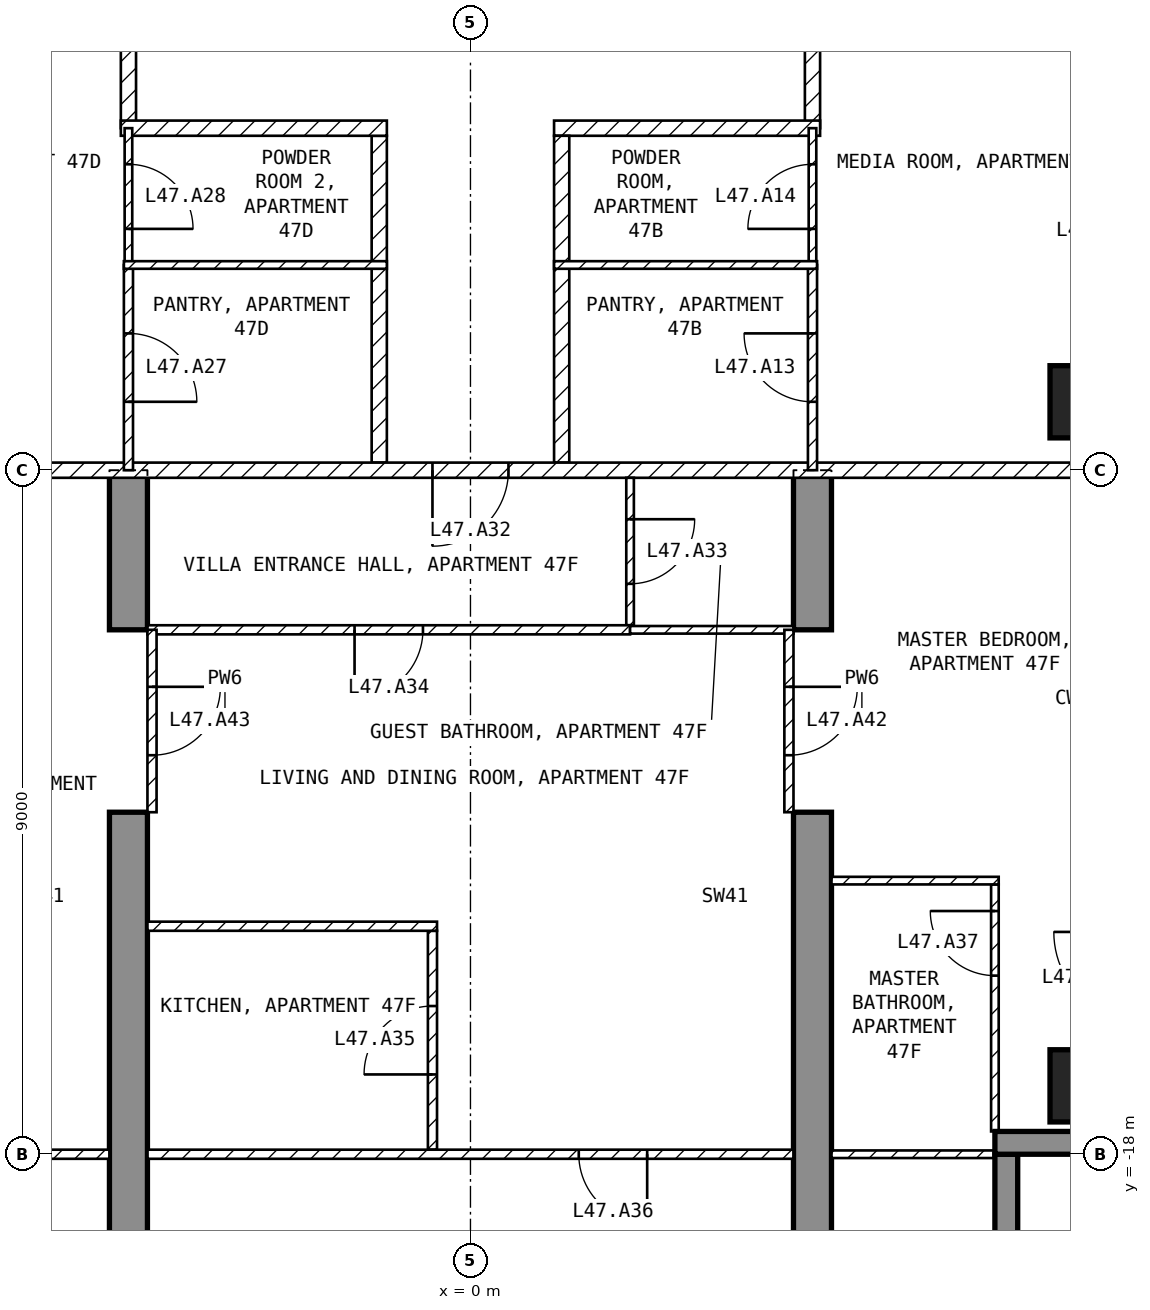
"""IFC4 building model, lengths in metres.
Left out: names, types, materials, properties, quantities, classifications, styles, units other than length and angle.
Written with IfcOpenShell. Run it as: python <this file> out.ifc"""

import sys

from ifc_helpers import new_model, si_unit, direction, frame, frame_2d, origin, origin_2d, place, context, subcontext, project, spatial, polyline, rectangle, outline, extrude, element, fill, save


model = new_model("IFC4")
c1 = context("Model", 3, precision=1e-05, world=origin(), true_north=direction((0.0, 1.0)))
c2 = subcontext(c1, "Body", "Model", "MODEL_VIEW")
j1 = project(units=[si_unit("LENGTHUNIT", "METRE"), si_unit("PLANEANGLEUNIT", "RADIAN")], contexts=[c1])
p1 = place(None, origin())
s1 = spatial("IfcSite", under=j1, at=p1, CompositionType="ELEMENT")
p2 = place(p1, origin())
s2 = spatial("IfcBuilding", under=s1, at=p2, CompositionType="ELEMENT")
p3 = place(p2, frame((0.0, 0.0, 191.1)))
s3 = spatial("IfcBuildingStorey", under=s2, at=p3, CompositionType="ELEMENT", Elevation=191.1)
for number, where, z_axis, x_axis in (
    (1, (8.1, -17.1, -0.25), (0.0, 0.0, 1.0), (1.0, 0.0, 0.0)),
    (2, (8.1, -8.1, -0.25), (0.0, 0.0, 1.0), (1.0, 0.0, 0.0)),
):
    element("IfcColumn", number, at=place(p3, frame(where, z_axis=z_axis, x_axis=x_axis)), inside=s3, PredefinedType="COLUMN", context=c2, shape_type="SweptSolid", body=[
        extrude(rectangle(XDim=0.95, YDim=0.95, at=origin_2d()), origin(), (0.0, 0.0, 1.0), 3.5),
    ])
for number, where, z_axis, x_axis in (
    (3, (-4.75, -20.225, -0.25), (1.0, 0.0, 0.0), (0.0, 1.0, 0.0)),
    (4, (4.25, -20.225, -0.25), (1.0, 0.0, 0.0), (0.0, 1.0, 0.0)),
):
    element("IfcWall", number, at=place(p3, frame(where, z_axis=z_axis, x_axis=x_axis)), inside=s3, PredefinedType="SHEAR", context=c2, shape_type="SweptSolid", body=[
        extrude(outline(polyline([(0.0, 0.0), (6.725, 0.0), (6.725, 2.65), (9.125, 2.65), (9.125, 0.0), (11.225, 0.0), (11.225, 3.5), (0.0, 3.5), (0.0, 0.0)])), origin(), (0.0, 0.0, 1.0), 0.5),
    ])
p4 = place(p3, frame((7.05, -19.8, 0.0), z_axis=(0.0, 0.0, 1.0), x_axis=(0.0, 1.0, 0.0)))
e5 = element("IfcWall", 5, at=p4, inside=s3, PredefinedType="SOLIDWALL", context=c2, shape_type="SweptSolid", body=[
    extrude(rectangle(XDim=1.8, YDim=0.3, at=frame_2d((0.9, 0.0))), origin(), (0.0, 0.0, 1.0), 3.25),
])
p5 = place(p3, frame((6.9, -17.85, 0.0), z_axis=(0.0, 0.0, 1.0), x_axis=(1.0, 0.0, 0.0)))
e6 = element("IfcWall", 6, at=p5, inside=s3, PredefinedType="SOLIDWALL", context=c2, shape_type="SweptSolid", body=[
    extrude(rectangle(XDim=1.85, YDim=0.3, at=frame_2d((0.925, 0.0))), origin(), (0.0, 0.0, 1.0), 3.25),
])
p6 = place(p3, frame((4.5, -1.3, 0.0), z_axis=(0.0, 0.0, 1.0), x_axis=(0.0, -1.0, 0.0)))
e7 = element("IfcWall", 7, at=p6, inside=s3, PredefinedType="PARTITIONING", context=c2, shape_type="SweptSolid", body=[
    extrude(rectangle(XDim=3.2, YDim=0.2, at=frame_2d((1.6, 0.0))), origin(), (0.0, 0.0, 1.0), 3.25),
])
p7 = place(p3, frame((4.6, -4.5, 0.0), z_axis=(0.0, 0.0, 1.0), x_axis=(-1.0, 0.0, 0.0)))
e8 = element("IfcWall", 8, at=p7, inside=s3, PredefinedType="PARTITIONING", context=c2, shape_type="SweptSolid", body=[
    extrude(rectangle(XDim=3.5, YDim=0.2, at=frame_2d((1.75, 0.0))), origin(), (0.0, 0.0, 1.0), 3.25),
])
p8 = place(p3, frame((1.2, -4.6, 0.0), z_axis=(0.0, 0.0, 1.0), x_axis=(0.0, -1.0, 0.0)))
e9 = element("IfcWall", 9, at=p8, inside=s3, PredefinedType="PARTITIONING", context=c2, shape_type="SweptSolid", body=[
    extrude(rectangle(XDim=4.3, YDim=0.2, at=frame_2d((2.15, 0.0))), origin(), (0.0, 0.0, 1.0), 3.25),
])
p9 = place(p3, frame((-4.5, -4.5, 0.0), z_axis=(0.0, 0.0, 1.0), x_axis=(0.0, 1.0, 0.0)))
e10 = element("IfcWall", 10, at=p9, inside=s3, PredefinedType="PARTITIONING", context=c2, shape_type="SweptSolid", body=[
    extrude(rectangle(XDim=3.2, YDim=0.2, at=frame_2d((1.6, 0.0))), origin(), (0.0, 0.0, 1.0), 3.25),
])
p10 = place(p3, frame((-1.2, -8.9, 0.0), z_axis=(0.0, 0.0, 1.0), x_axis=(0.0, 1.0, 0.0)))
e11 = element("IfcWall", 11, at=p10, inside=s3, PredefinedType="PARTITIONING", context=c2, shape_type="SweptSolid", body=[
    extrude(rectangle(XDim=4.3, YDim=0.2, at=frame_2d((2.15, 0.0))), origin(), (0.0, 0.0, 1.0), 3.25),
])
p11 = place(p3, frame((-1.1, -4.5, 0.0), z_axis=(0.0, 0.0, 1.0), x_axis=(-1.0, 0.0, 0.0)))
e12 = element("IfcWall", 12, at=p11, inside=s3, PredefinedType="PARTITIONING", context=c2, shape_type="SweptSolid", body=[
    extrude(rectangle(XDim=3.5, YDim=0.2, at=frame_2d((1.75, 0.0))), origin(), (0.0, 0.0, 1.0), 3.25),
])
p12 = place(p3, frame((8.92, -9.0, 0.0), z_axis=(0.0, 0.0, 1.0), x_axis=(-1.0, 0.0, 0.0)))
e13 = element("IfcWall", 13, at=p12, inside=s3, PredefinedType="PARTITIONING", context=c2, shape_type="SweptSolid", body=[
    extrude(rectangle(XDim=17.84, YDim=0.2, at=frame_2d((8.92, 0.0))), origin(), (0.0, 0.0, 1.0), 3.25),
])
p13 = place(p12, frame((8.42, 0.0, 0.0)))
e14 = element("IfcOpeningElement", 14, at=p13, cuts=e13, PredefinedType="OPENING", context=c2, shape_type="SweptSolid", body=[
    extrude(rectangle(XDim=1.0, YDim=2.1, at=frame_2d((0.5, 1.05))), frame((0.0, 0.11, 0.0), z_axis=(0.0, -1.0, 0.0), x_axis=(1.0, 0.0, 0.0)), (0.0, 0.0, 1.0), 0.22),
])
p14 = place(p3, frame((4.5, -6.3, 0.0), z_axis=(0.0, 0.0, 1.0), x_axis=(0.0, 1.0, 0.0)))
e15 = element("IfcWall", 15, at=p14, inside=s3, PredefinedType="PARTITIONING", context=c2, shape_type="SweptSolid", body=[
    extrude(rectangle(XDim=1.8, YDim=0.1, at=frame_2d((0.9, 0.0))), origin(), (0.0, 0.0, 1.0), 3.25),
])
p15 = place(p14, frame((0.475, 0.0, 0.0)))
e16 = element("IfcOpeningElement", 16, at=p15, cuts=e15, PredefinedType="OPENING", context=c2, shape_type="SweptSolid", body=[
    extrude(rectangle(XDim=0.85, YDim=2.1, at=frame_2d((0.425, 1.05))), frame((0.0, 0.06, 0.0), z_axis=(0.0, -1.0, 0.0), x_axis=(1.0, 0.0, 0.0)), (0.0, 0.0, 1.0), 0.12),
])
p16 = place(p3, frame((4.5, -9.0, 0.0), z_axis=(0.0, 0.0, 1.0), x_axis=(0.0, 1.0, 0.0)))
e17 = element("IfcWall", 17, at=p16, inside=s3, PredefinedType="PARTITIONING", context=c2, shape_type="SweptSolid", body=[
    extrude(rectangle(XDim=2.7, YDim=0.12, at=frame_2d((1.35, 0.0))), origin(), (0.0, 0.0, 1.0), 3.25),
])
p17 = place(p16, frame((0.9, 0.0, 0.0)))
e18 = element("IfcOpeningElement", 18, at=p17, cuts=e17, PredefinedType="OPENING", context=c2, shape_type="SweptSolid", body=[
    extrude(rectangle(XDim=0.9, YDim=2.1, at=frame_2d((0.45, 1.05))), frame((0.0, 0.07, 0.0), z_axis=(0.0, -1.0, 0.0), x_axis=(1.0, 0.0, 0.0)), (0.0, 0.0, 1.0), 0.14),
])
p18 = place(p3, frame((4.56, -6.3, 0.0), z_axis=(0.0, 0.0, 1.0), x_axis=(-1.0, 0.0, 0.0)))
e19 = element("IfcWall", 19, at=p18, inside=s3, PredefinedType="PARTITIONING", context=c2, shape_type="SweptSolid", body=[
    extrude(rectangle(XDim=3.46, YDim=0.1, at=frame_2d((1.73, 0.0))), origin(), (0.0, 0.0, 1.0), 3.25),
])
p19 = place(p3, frame((-4.5, -4.5, 0.0), z_axis=(0.0, 0.0, 1.0), x_axis=(0.0, -1.0, 0.0)))
e20 = element("IfcWall", 20, at=p19, inside=s3, PredefinedType="PARTITIONING", context=c2, shape_type="SweptSolid", body=[
    extrude(rectangle(XDim=1.8, YDim=0.1, at=frame_2d((0.9, 0.0))), origin(), (0.0, 0.0, 1.0), 3.25),
])
p20 = place(p19, frame((0.475, 0.0, 0.0)))
e21 = element("IfcOpeningElement", 21, at=p20, cuts=e20, PredefinedType="OPENING", context=c2, shape_type="SweptSolid", body=[
    extrude(rectangle(XDim=0.85, YDim=2.1, at=frame_2d((0.425, 1.05))), frame((0.0, 0.06, 0.0), z_axis=(0.0, -1.0, 0.0), x_axis=(1.0, 0.0, 0.0)), (0.0, 0.0, 1.0), 0.12),
])
p21 = place(p3, frame((-4.5, -6.3, 0.0), z_axis=(0.0, 0.0, 1.0), x_axis=(0.0, -1.0, 0.0)))
e22 = element("IfcWall", 22, at=p21, inside=s3, PredefinedType="PARTITIONING", context=c2, shape_type="SweptSolid", body=[
    extrude(rectangle(XDim=2.7, YDim=0.12, at=frame_2d((1.35, 0.0))), origin(), (0.0, 0.0, 1.0), 3.25),
])
p22 = place(p21, frame((0.9, 0.0, 0.0)))
e23 = element("IfcOpeningElement", 23, at=p22, cuts=e22, PredefinedType="OPENING", context=c2, shape_type="SweptSolid", body=[
    extrude(rectangle(XDim=0.9, YDim=2.1, at=frame_2d((0.45, 1.05))), frame((0.0, 0.07, 0.0), z_axis=(0.0, -1.0, 0.0), x_axis=(1.0, 0.0, 0.0)), (0.0, 0.0, 1.0), 0.14),
])
p23 = place(p3, frame((-1.1, -6.3, 0.0), z_axis=(0.0, 0.0, 1.0), x_axis=(-1.0, 0.0, 0.0)))
e24 = element("IfcWall", 24, at=p23, inside=s3, PredefinedType="PARTITIONING", context=c2, shape_type="SweptSolid", body=[
    extrude(rectangle(XDim=3.46, YDim=0.1, at=frame_2d((1.73, 0.0))), origin(), (0.0, 0.0, 1.0), 3.25),
])
p24 = place(p3, frame((2.1, -9.1, 0.0), z_axis=(0.0, 0.0, 1.0), x_axis=(0.0, -1.0, 0.0)))
e25 = element("IfcWall", 25, at=p24, inside=s3, PredefinedType="PARTITIONING", context=c2, shape_type="SweptSolid", body=[
    extrude(rectangle(XDim=1.94, YDim=0.1, at=frame_2d((0.97, 0.0))), origin(), (0.0, 0.0, 1.0), 3.25),
])
p25 = place(p24, frame((0.545, 0.0, 0.0)))
e26 = element("IfcOpeningElement", 26, at=p25, cuts=e25, PredefinedType="OPENING", context=c2, shape_type="SweptSolid", body=[
    extrude(rectangle(XDim=0.85, YDim=2.1, at=frame_2d((0.425, 1.05))), frame((0.0, 0.06, 0.0), z_axis=(0.0, -1.0, 0.0), x_axis=(1.0, 0.0, 0.0)), (0.0, 0.0, 1.0), 0.12),
])
p26 = place(p3, frame((2.1, -11.1, 0.0), z_axis=(0.0, 0.0, 1.0), x_axis=(-1.0, 0.0, 0.0)))
e27 = element("IfcWall", 27, at=p26, inside=s3, PredefinedType="PARTITIONING", context=c2, shape_type="SweptSolid", body=[
    extrude(rectangle(XDim=6.35, YDim=0.12, at=frame_2d((3.175, 0.0))), origin(), (0.0, 0.0, 1.0), 3.25),
])
p27 = place(p26, frame((2.725, 0.0, 0.0)))
e28 = element("IfcOpeningElement", 28, at=p27, cuts=e27, PredefinedType="OPENING", context=c2, shape_type="SweptSolid", body=[
    extrude(rectangle(XDim=0.9, YDim=2.1, at=frame_2d((0.45, 1.05))), frame((0.0, 0.07, 0.0), z_axis=(0.0, -1.0, 0.0), x_axis=(1.0, 0.0, 0.0)), (0.0, 0.0, 1.0), 0.14),
])
p28 = place(p3, frame((4.25, -11.1, 0.0), z_axis=(0.0, 0.0, 1.0), x_axis=(-1.0, 0.0, 0.0)))
e29 = element("IfcWall", 29, at=p28, inside=s3, PredefinedType="PARTITIONING", context=c2, shape_type="SweptSolid", body=[
    extrude(rectangle(XDim=2.15, YDim=0.1, at=frame_2d((1.075, 0.0))), origin(), (0.0, 0.0, 1.0), 3.25),
])
p29 = place(p3, frame((-0.5, -17.94, 0.0), z_axis=(0.0, 0.0, 1.0), x_axis=(0.0, 1.0, 0.0)))
e30 = element("IfcWall", 30, at=p29, inside=s3, PredefinedType="PARTITIONING", context=c2, shape_type="SweptSolid", body=[
    extrude(rectangle(XDim=2.88, YDim=0.12, at=frame_2d((1.44, 0.0))), origin(), (0.0, 0.0, 1.0), 3.25),
])
p30 = place(p29, frame((0.99, 0.0, 0.0)))
e31 = element("IfcOpeningElement", 31, at=p30, cuts=e30, PredefinedType="OPENING", context=c2, shape_type="SweptSolid", body=[
    extrude(rectangle(XDim=0.9, YDim=2.1, at=frame_2d((0.45, 1.05))), frame((0.0, 0.07, 0.0), z_axis=(0.0, -1.0, 0.0), x_axis=(1.0, 0.0, 0.0)), (0.0, 0.0, 1.0), 0.14),
])
p31 = place(p3, frame((-0.44, -15.0, 0.0), z_axis=(0.0, 0.0, 1.0), x_axis=(-1.0, 0.0, 0.0)))
e32 = element("IfcWall", 32, at=p31, inside=s3, PredefinedType="PARTITIONING", context=c2, shape_type="SweptSolid", body=[
    extrude(rectangle(XDim=3.81, YDim=0.12, at=frame_2d((1.905, 0.0))), origin(), (0.0, 0.0, 1.0), 3.25),
])
p32 = place(p3, frame((4.25, -18.0, 0.0), z_axis=(0.0, 0.0, 1.0), x_axis=(-1.0, 0.0, 0.0)))
e33 = element("IfcWall", 33, at=p32, inside=s3, PredefinedType="PARTITIONING", context=c2, shape_type="SweptSolid", body=[
    extrude(rectangle(XDim=8.5, YDim=0.12, at=frame_2d((4.25, 0.0))), origin(), (0.0, 0.0, 1.0), 3.25),
])
p33 = place(p32, frame((1.925, 0.0, 0.0)))
e34 = element("IfcOpeningElement", 34, at=p33, cuts=e33, PredefinedType="OPENING", context=c2, shape_type="SweptSolid", body=[
    extrude(rectangle(XDim=0.9, YDim=2.1, at=frame_2d((0.45, 1.05))), frame((0.0, 0.07, 0.0), z_axis=(0.0, -1.0, 0.0), x_axis=(1.0, 0.0, 0.0)), (0.0, 0.0, 1.0), 0.14),
])
p34 = place(p3, frame((6.9, -17.7, 0.0), z_axis=(0.0, 0.0, 1.0), x_axis=(0.0, 1.0, 0.0)))
e35 = element("IfcWall", 35, at=p34, inside=s3, PredefinedType="PARTITIONING", context=c2, shape_type="SweptSolid", body=[
    extrude(rectangle(XDim=3.25, YDim=0.1, at=frame_2d((1.625, 0.0))), origin(), (0.0, 0.0, 1.0), 3.25),
])
p35 = place(p34, frame((2.05, 0.0, 0.0)))
e36 = element("IfcOpeningElement", 36, at=p35, cuts=e35, PredefinedType="OPENING", context=c2, shape_type="SweptSolid", body=[
    extrude(rectangle(XDim=0.85, YDim=2.1, at=frame_2d((0.425, 1.05))), frame((0.0, 0.06, 0.0), z_axis=(0.0, -1.0, 0.0), x_axis=(1.0, 0.0, 0.0)), (0.0, 0.0, 1.0), 0.12),
])
p36 = place(p3, frame((6.95, -14.4, 0.0), z_axis=(0.0, 0.0, 1.0), x_axis=(-1.0, 0.0, 0.0)))
e37 = element("IfcWall", 37, at=p36, inside=s3, PredefinedType="PARTITIONING", context=c2, shape_type="SweptSolid", body=[
    extrude(rectangle(XDim=2.2, YDim=0.1, at=frame_2d((1.1, 0.0))), origin(), (0.0, 0.0, 1.0), 3.25),
])
p37 = place(p3, frame((7.12, -18.0, 0.0), z_axis=(0.0, 0.0, 1.0), x_axis=(-1.0, 0.0, 0.0)))
e38 = element("IfcWall", 38, at=p37, inside=s3, PredefinedType="PARTITIONING", context=c2, shape_type="SweptSolid", body=[
    extrude(rectangle(XDim=2.37, YDim=0.1, at=frame_2d((1.185, 0.0))), origin(), (0.0, 0.0, 1.0), 3.25),
])
p38 = place(p3, frame((-4.75, -18.0, 0.0), z_axis=(0.0, 0.0, 1.0), x_axis=(-1.0, 0.0, 0.0)))
e39 = element("IfcWall", 39, at=p38, inside=s3, PredefinedType="PARTITIONING", context=c2, shape_type="SweptSolid", body=[
    extrude(rectangle(XDim=2.37, YDim=0.12, at=frame_2d((1.185, 0.0))), origin(), (0.0, 0.0, 1.0), 3.25),
])
p39 = place(p3, frame((4.19, -11.1, 0.0), z_axis=(0.0, 0.0, 1.0), x_axis=(0.0, -1.0, 0.0)))
e40 = element("IfcWall", 40, at=p39, inside=s3, PredefinedType="PARTITIONING", context=c2, shape_type="SweptSolid", body=[
    extrude(rectangle(XDim=2.4, YDim=0.12, at=frame_2d((1.2, 0.0))), origin(), (0.0, 0.0, 1.0), 2.4),
])
p40 = place(p39, frame((0.75, 0.0, 0.0)))
e41 = element("IfcOpeningElement", 41, at=p40, cuts=e40, PredefinedType="OPENING", context=c2, shape_type="SweptSolid", body=[
    extrude(rectangle(XDim=0.9, YDim=2.1, at=frame_2d((0.45, 1.05))), frame((0.0, 0.07, 0.0), z_axis=(0.0, -1.0, 0.0), x_axis=(1.0, 0.0, 0.0)), (0.0, 0.0, 1.0), 0.14),
])
p41 = place(p3, frame((-4.19, -11.1, 0.0), z_axis=(0.0, 0.0, 1.0), x_axis=(0.0, -1.0, 0.0)))
e42 = element("IfcWall", 42, at=p41, inside=s3, PredefinedType="PARTITIONING", context=c2, shape_type="SweptSolid", body=[
    extrude(rectangle(XDim=2.4, YDim=0.12, at=frame_2d((1.2, 0.0))), origin(), (0.0, 0.0, 1.0), 2.4),
])
p42 = place(p41, frame((0.75, 0.0, 0.0)))
e43 = element("IfcOpeningElement", 43, at=p42, cuts=e42, PredefinedType="OPENING", context=c2, shape_type="SweptSolid", body=[
    extrude(rectangle(XDim=0.9, YDim=2.1, at=frame_2d((0.45, 1.05))), frame((0.0, 0.07, 0.0), z_axis=(0.0, -1.0, 0.0), x_axis=(1.0, 0.0, 0.0)), (0.0, 0.0, 1.0), 0.14),
])
p43 = place(p17, origin())
e44 = element("IfcDoor", 44, at=p43, inside=s3, OperationType="SINGLE_SWING_RIGHT", PredefinedType="DOOR", context=c2, shape_type="SweptSolid", body=[
    extrude(rectangle(XDim=0.9, YDim=2.1, at=frame_2d((0.45, 1.05))), frame((0.0, 0.025, 0.0), z_axis=(0.0, -1.0, 0.0), x_axis=(1.0, 0.0, 0.0)), (0.0, 0.0, 1.0), 0.05),
])
fill(e18, e44)
p44 = place(p15, origin())
e45 = element("IfcDoor", 45, at=p44, inside=s3, OperationType="SINGLE_SWING_LEFT", PredefinedType="DOOR", context=c2, shape_type="SweptSolid", body=[
    extrude(rectangle(XDim=0.85, YDim=2.1, at=frame_2d((0.425, 1.05))), frame((0.0, 0.025, 0.0), z_axis=(0.0, -1.0, 0.0), x_axis=(1.0, 0.0, 0.0)), (0.0, 0.0, 1.0), 0.05),
])
fill(e16, e45)
p45 = place(p22, origin())
e46 = element("IfcDoor", 46, at=p45, inside=s3, OperationType="SINGLE_SWING_RIGHT", PredefinedType="DOOR", context=c2, shape_type="SweptSolid", body=[
    extrude(rectangle(XDim=0.9, YDim=2.1, at=frame_2d((0.45, 1.05))), frame((0.0, 0.025, 0.0), z_axis=(0.0, -1.0, 0.0), x_axis=(1.0, 0.0, 0.0)), (0.0, 0.0, 1.0), 0.05),
])
fill(e23, e46)
p46 = place(p20, origin())
e47 = element("IfcDoor", 47, at=p46, inside=s3, OperationType="SINGLE_SWING_RIGHT", PredefinedType="DOOR", context=c2, shape_type="SweptSolid", body=[
    extrude(rectangle(XDim=0.85, YDim=2.1, at=frame_2d((0.425, 1.05))), frame((0.0, 0.025, 0.0), z_axis=(0.0, -1.0, 0.0), x_axis=(1.0, 0.0, 0.0)), (0.0, 0.0, 1.0), 0.05),
])
fill(e21, e47)
p47 = place(p13, origin())
e48 = element("IfcDoor", 48, at=p47, inside=s3, OperationType="SINGLE_SWING_RIGHT", PredefinedType="DOOR", context=c2, shape_type="SweptSolid", body=[
    extrude(rectangle(XDim=1.0, YDim=2.1, at=frame_2d((0.5, 1.05))), frame((0.0, 0.025, 0.0), z_axis=(0.0, -1.0, 0.0), x_axis=(1.0, 0.0, 0.0)), (0.0, 0.0, 1.0), 0.05),
])
fill(e14, e48)
p48 = place(p25, origin())
e49 = element("IfcDoor", 49, at=p48, inside=s3, OperationType="SINGLE_SWING_LEFT", PredefinedType="DOOR", context=c2, shape_type="SweptSolid", body=[
    extrude(rectangle(XDim=0.85, YDim=2.1, at=frame_2d((0.425, 1.05))), frame((0.0, 0.025, 0.0), z_axis=(0.0, -1.0, 0.0), x_axis=(1.0, 0.0, 0.0)), (0.0, 0.0, 1.0), 0.05),
])
fill(e26, e49)
p49 = place(p27, origin())
e50 = element("IfcDoor", 50, at=p49, inside=s3, OperationType="SINGLE_SWING_RIGHT", PredefinedType="DOOR", context=c2, shape_type="SweptSolid", body=[
    extrude(rectangle(XDim=0.9, YDim=2.1, at=frame_2d((0.45, 1.05))), frame((0.0, 0.025, 0.0), z_axis=(0.0, -1.0, 0.0), x_axis=(1.0, 0.0, 0.0)), (0.0, 0.0, 1.0), 0.05),
])
fill(e28, e50)
p50 = place(p30, origin())
e51 = element("IfcDoor", 51, at=p50, inside=s3, OperationType="SINGLE_SWING_LEFT", PredefinedType="DOOR", context=c2, shape_type="SweptSolid", body=[
    extrude(rectangle(XDim=0.9, YDim=2.1, at=frame_2d((0.45, 1.05))), frame((0.0, 0.025, 0.0), z_axis=(0.0, -1.0, 0.0), x_axis=(1.0, 0.0, 0.0)), (0.0, 0.0, 1.0), 0.05),
])
fill(e31, e51)
p51 = place(p33, origin())
e52 = element("IfcDoor", 52, at=p51, inside=s3, OperationType="SINGLE_SWING_LEFT", PredefinedType="DOOR", context=c2, shape_type="SweptSolid", body=[
    extrude(rectangle(XDim=0.9, YDim=2.1, at=frame_2d((0.45, 1.05))), frame((0.0, 0.025, 0.0), z_axis=(0.0, -1.0, 0.0), x_axis=(1.0, 0.0, 0.0)), (0.0, 0.0, 1.0), 0.05),
])
fill(e34, e52)
p52 = place(p35, origin())
e53 = element("IfcDoor", 53, at=p52, inside=s3, OperationType="SINGLE_SWING_RIGHT", PredefinedType="DOOR", context=c2, shape_type="SweptSolid", body=[
    extrude(rectangle(XDim=0.85, YDim=2.1, at=frame_2d((0.425, 1.05))), frame((0.0, 0.025, 0.0), z_axis=(0.0, -1.0, 0.0), x_axis=(1.0, 0.0, 0.0)), (0.0, 0.0, 1.0), 0.05),
])
fill(e36, e53)
p53 = place(p40, origin())
e54 = element("IfcDoor", 54, at=p53, inside=s3, OperationType="SINGLE_SWING_LEFT", PredefinedType="DOOR", context=c2, shape_type="SweptSolid", body=[
    extrude(rectangle(XDim=0.9, YDim=2.1, at=frame_2d((0.45, 1.05))), frame((0.0, 0.025, 0.0), z_axis=(0.0, -1.0, 0.0), x_axis=(1.0, 0.0, 0.0)), (0.0, 0.0, 1.0), 0.05),
])
fill(e41, e54)
p54 = place(p42, origin())
e55 = element("IfcDoor", 55, at=p54, inside=s3, OperationType="SINGLE_SWING_LEFT", PredefinedType="DOOR", context=c2, shape_type="SweptSolid", body=[
    extrude(rectangle(XDim=0.9, YDim=2.1, at=frame_2d((0.45, 1.05))), frame((0.0, 0.025, 0.0), z_axis=(0.0, -1.0, 0.0), x_axis=(1.0, 0.0, 0.0)), (0.0, 0.0, 1.0), 0.05),
])
fill(e43, e55)
save(model, sys.argv[1])
